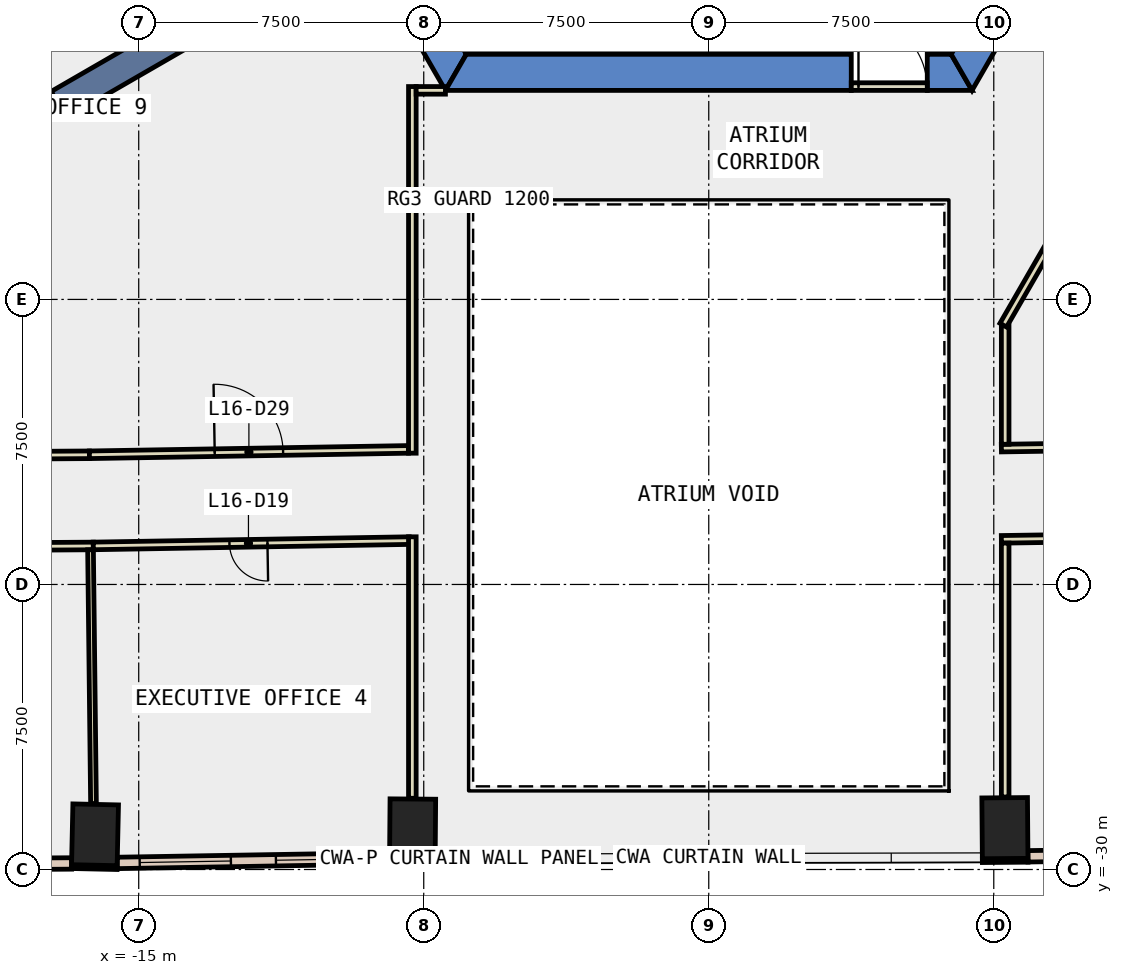
"""IFC4 building model, lengths in metres.
Left out: names, types, materials, properties, quantities, classifications, styles, units other than length and angle.
Written with IfcOpenShell. Run it as: python <this file> out.ifc"""

import sys

from ifc_helpers import new_model, si_unit, direction, frame, frame_2d, origin, origin_2d, place, context, subcontext, project, spatial, polyline, rectangle, outline, extrude, element, fill, save


model = new_model("IFC4")
c1 = context("Model", 3, precision=1e-05, world=origin(), true_north=direction((0.0, 1.0)))
c2 = subcontext(c1, "Body", "Model", "MODEL_VIEW")
j1 = project(units=[si_unit("LENGTHUNIT", "METRE"), si_unit("PLANEANGLEUNIT", "RADIAN")], contexts=[c1])
p1 = place(None, origin())
s1 = spatial("IfcSite", under=j1, at=p1, CompositionType="ELEMENT")
p2 = place(p1, origin())
s2 = spatial("IfcBuilding", under=s1, at=p2, CompositionType="ELEMENT")
p3 = place(p2, frame((0.0, 0.0, 77.0)))
s3 = spatial("IfcBuildingStorey", under=s2, at=p3, CompositionType="ELEMENT", Elevation=77.0)
for number, where, z_axis, x_axis in (
    (1, (-16.15, -29.087, -0.4), (0.0, 0.0, 1.0), (-1.0, 0.022, 0.0)),
    (2, (-7.793, -28.946, -0.4), (0.0, 0.0, 1.0), (-1.0, 0.008, 0.0)),
    (3, (7.793, -28.912, -0.4), (0.0, 0.0, 1.0), (1.0, 0.008, 0.0)),
):
    element("IfcColumn", number, at=place(p3, frame(where, z_axis=z_axis, x_axis=x_axis)), inside=s3, PredefinedType="COLUMN", context=c2, shape_type="SweptSolid", body=[
        extrude(rectangle(XDim=1.2, YDim=1.6, at=origin_2d()), origin(), (0.0, 0.0, 1.0), 4.0),
    ])
p4 = place(p3, frame((0.0, 0.0, -0.4)))
e4 = element("IfcWall", 4, at=p4, inside=s3, PredefinedType="SHEAR", context=c2, shape_type="SweptSolid", body=[
    extrude(outline(polyline([(-13.856, 2.5), (-6.928, -9.5), (-6.38, -8.55), (-12.759, 2.5), (-13.856, 2.5)])), origin(), (0.0, 0.0, 1.0), 4.0),
])
p5 = place(p3, frame((0.0, 0.0, -0.4)))
e5 = element("IfcWall", 5, at=p5, inside=s3, PredefinedType="SHEAR", context=c2, shape_type="SweptSolid", body=[
    extrude(outline(polyline([(3.75, -9.5), (3.75, -8.55), (-6.38, -8.55), (-6.928, -9.5), (3.75, -9.5)])), origin(), (0.0, 0.0, 1.0), 4.0),
])
p6 = place(p3, frame((0.0, 0.0, -0.4)))
e6 = element("IfcWall", 6, at=p6, inside=s3, PredefinedType="SHEAR", context=c2, shape_type="SweptSolid", body=[
    extrude(outline(polyline([(5.75, -8.55), (5.75, -9.5), (6.928, -9.5), (6.38, -8.55), (5.75, -8.55)])), origin(), (0.0, 0.0, 1.0), 4.0),
])
p7 = place(p3, frame((0.0, 0.0, -0.4)))
e7 = element("IfcWall", 7, at=p7, inside=s3, PredefinedType="SHEAR", context=c2, shape_type="SweptSolid", body=[
    extrude(outline(polyline([(8.117, -7.44), (7.295, -6.965), (6.38, -8.55), (6.928, -9.5), (8.117, -7.44)])), origin(), (0.0, 0.0, 1.0), 4.0),
])
p8 = place(p3, frame((-9.31, -5.375, -0.4), z_axis=(0.0, 0.0, 1.0), x_axis=(-0.866017533419, -0.500013631625, 0.0)))
e8 = element("IfcWall", 8, at=p8, inside=s3, PredefinedType="SHEAR", context=c2, shape_type="SweptSolid", body=[
    extrude(rectangle(XDim=9.0, YDim=0.8, at=frame_2d((4.5, 0.0))), origin(), (0.0, 0.0, 1.0), 4.0),
])
p9 = place(p3, frame((-16.769, -29.924, 0.0), z_axis=(0.0, 0.0, 1.0), x_axis=(0.99976752127, -0.021561618973, 0.0)))
e9 = element("IfcWall", 9, at=p9, inside=s3, PredefinedType="STANDARD", context=c2, shape_type="SweptSolid", body=[
    extrude(rectangle(XDim=1.2, YDim=0.1, at=frame_2d((0.6, 0.0))), origin(), (0.0, 0.0, 1.0), 3.6),
])
for number, where, z_axis, x_axis in (
    (10, (-8.4, -29.791, 0.0), (0.0, 0.0, 1.0), (1.0, -0.008, 0.0)),
    (11, (7.2, -29.767, 0.0), (0.0, 0.0, 1.0), (1.0, 0.008, 0.0)),
):
    element("IfcWall", number, at=place(p3, frame(where, z_axis=z_axis, x_axis=x_axis)), inside=s3, PredefinedType="STANDARD", context=c2, shape_type="SweptSolid", body=[
        extrude(rectangle(XDim=1.2, YDim=0.1, at=frame_2d((0.6, 0.0))), origin(), (0.0, 0.0, 1.0), 3.6),
    ])
p10 = place(p3, frame((-23.935, -29.888, 0.0), z_axis=(0.0, 0.0, 1.0), x_axis=(0.999978623918, 0.006538478947, 0.0)))
e12 = element("IfcWall", 12, at=p10, inside=s3, PredefinedType="STANDARD", context=c2, shape_type="SweptSolid", body=[
    extrude(rectangle(XDim=7.169, YDim=0.3, at=frame_2d((3.584, 0.0))), origin(), (0.0, 0.0, 1.0), 3.6),
])
p11 = place(p10, frame((0.592, 0.0, 0.9)))
e13 = element("IfcOpeningElement", 13, at=p11, cuts=e12, PredefinedType="OPENING", context=c2, shape_type="SweptSolid", body=[
    extrude(rectangle(XDim=2.4, YDim=2.6, at=frame_2d((1.2, 1.3))), frame((0.0, 0.16, 0.0), z_axis=(0.0, -1.0, 0.0), x_axis=(1.0, 0.0, 0.0)), (0.0, 0.0, 1.0), 0.32),
])
p12 = place(p10, frame((4.177, 0.0, 0.9)))
e14 = element("IfcOpeningElement", 14, at=p12, cuts=e12, PredefinedType="OPENING", context=c2, shape_type="SweptSolid", body=[
    extrude(rectangle(XDim=2.4, YDim=2.6, at=frame_2d((1.2, 1.3))), frame((0.0, 0.16, 0.0), z_axis=(0.0, -1.0, 0.0), x_axis=(1.0, 0.0, 0.0)), (0.0, 0.0, 1.0), 0.32),
])
p13 = place(p3, frame((-15.567, -29.827, 0.0), z_axis=(0.0, 0.0, 1.0), x_axis=(0.999857944706, 0.0168549817, 0.0)))
e15 = element("IfcWall", 15, at=p13, inside=s3, PredefinedType="STANDARD", context=c2, shape_type="SweptSolid", body=[
    extrude(rectangle(XDim=7.17, YDim=0.3, at=frame_2d((3.585, 0.0))), origin(), (0.0, 0.0, 1.0), 3.6),
])
p14 = place(p13, frame((0.593, 0.0, 0.9)))
e16 = element("IfcOpeningElement", 16, at=p14, cuts=e15, PredefinedType="OPENING", context=c2, shape_type="SweptSolid", body=[
    extrude(rectangle(XDim=2.4, YDim=2.6, at=frame_2d((1.2, 1.3))), frame((0.0, 0.16, 0.0), z_axis=(0.0, -1.0, 0.0), x_axis=(1.0, 0.0, 0.0)), (0.0, 0.0, 1.0), 0.32),
])
p15 = place(p13, frame((4.178, 0.0, 0.9)))
e17 = element("IfcOpeningElement", 17, at=p15, cuts=e15, PredefinedType="OPENING", context=c2, shape_type="SweptSolid", body=[
    extrude(rectangle(XDim=2.4, YDim=2.6, at=frame_2d((1.2, 1.3))), frame((0.0, 0.16, 0.0), z_axis=(0.0, -1.0, 0.0), x_axis=(1.0, 0.0, 0.0)), (0.0, 0.0, 1.0), 0.32),
])
p16 = place(p3, frame((8.398, -29.653, 0.0), z_axis=(0.0, 0.0, 1.0), x_axis=(0.999888301342, 0.014946064363, 0.0)))
e18 = element("IfcWall", 18, at=p16, inside=s3, PredefinedType="STANDARD", context=c2, shape_type="SweptSolid", body=[
    extrude(rectangle(XDim=7.171, YDim=0.3, at=frame_2d((3.585, 0.0))), origin(), (0.0, 0.0, 1.0), 3.6),
])
p17 = place(p16, frame((0.593, 0.0, 0.9)))
e19 = element("IfcOpeningElement", 19, at=p17, cuts=e18, PredefinedType="OPENING", context=c2, shape_type="SweptSolid", body=[
    extrude(rectangle(XDim=2.4, YDim=2.6, at=frame_2d((1.2, 1.3))), frame((0.0, 0.16, 0.0), z_axis=(0.0, -1.0, 0.0), x_axis=(1.0, 0.0, 0.0)), (0.0, 0.0, 1.0), 0.32),
])
p18 = place(p16, frame((4.178, 0.0, 0.9)))
e20 = element("IfcOpeningElement", 20, at=p18, cuts=e18, PredefinedType="OPENING", context=c2, shape_type="SweptSolid", body=[
    extrude(rectangle(XDim=2.4, YDim=2.6, at=frame_2d((1.2, 1.3))), frame((0.0, 0.16, 0.0), z_axis=(0.0, -1.0, 0.0), x_axis=(1.0, 0.0, 0.0)), (0.0, 0.0, 1.0), 0.32),
])
p19 = place(p3, frame((7.7, -18.912, 0.0), z_axis=(0.0, 0.0, 1.0), x_axis=(0.999888819649, 0.014911349423, 0.0)))
e21 = element("IfcWall", 21, at=p19, inside=s3, PredefinedType="PARTITIONING", context=c2, shape_type="SweptSolid", body=[
    extrude(rectangle(XDim=8.252, YDim=0.2, at=frame_2d((4.126, 0.0))), origin(), (0.0, 0.0, 1.0), 3.6),
])
p20 = place(p19, frame((3.626, 0.0, 0.0)))
e22 = element("IfcOpeningElement", 22, at=p20, cuts=e21, PredefinedType="OPENING", context=c2, shape_type="SweptSolid", body=[
    extrude(rectangle(XDim=1.0, YDim=2.1, at=frame_2d((0.5, 1.05))), frame((0.0, 0.11, 0.0), z_axis=(0.0, -1.0, 0.0), x_axis=(1.0, 0.0, 0.0)), (0.0, 0.0, 1.0), 0.22),
])
p21 = place(p3, frame((-24.528, -19.142, 0.0), z_axis=(0.0, 0.0, 1.0), x_axis=(0.999978315754, 0.00658544011, 0.0)))
e23 = element("IfcWall", 23, at=p21, inside=s3, PredefinedType="PARTITIONING", context=c2, shape_type="SweptSolid", body=[
    extrude(rectangle(XDim=8.23, YDim=0.2, at=frame_2d((4.115, 0.0))), origin(), (0.0, 0.0, 1.0), 3.6),
])
p22 = place(p3, frame((-16.298, -19.088, 0.0), z_axis=(0.0, 0.0, 1.0), x_axis=(0.999857252997, 0.016895964865, 0.0)))
e24 = element("IfcWall", 24, at=p22, inside=s3, PredefinedType="PARTITIONING", context=c2, shape_type="SweptSolid", body=[
    extrude(rectangle(XDim=8.395, YDim=0.2, at=frame_2d((4.198, 0.0))), origin(), (0.0, 0.0, 1.0), 3.6),
])
p23 = place(p22, frame((3.298, 0.0, 0.0)))
e25 = element("IfcOpeningElement", 25, at=p23, cuts=e24, PredefinedType="OPENING", context=c2, shape_type="SweptSolid", body=[
    extrude(rectangle(XDim=1.8, YDim=2.1, at=frame_2d((0.9, 1.05))), frame((0.0, 0.11, 0.0), z_axis=(0.0, -1.0, 0.0), x_axis=(1.0, 0.0, 0.0)), (0.0, 0.0, 1.0), 0.22),
])
p24 = place(p3, frame((15.999, -21.189, 0.0), z_axis=(0.0, 0.0, 1.0), x_axis=(-0.999888353348, -0.014942584753, 0.0)))
e26 = element("IfcWall", 26, at=p24, inside=s3, PredefinedType="PARTITIONING", context=c2, shape_type="SweptSolid", body=[
    extrude(rectangle(XDim=8.3, YDim=0.2, at=frame_2d((4.15, 0.0))), origin(), (0.0, 0.0, 1.0), 3.6),
])
p25 = place(p24, frame((3.55, 0.0, 0.0)))
e27 = element("IfcOpeningElement", 27, at=p25, cuts=e26, PredefinedType="OPENING", context=c2, shape_type="SweptSolid", body=[
    extrude(rectangle(XDim=1.0, YDim=2.1, at=frame_2d((0.5, 1.05))), frame((0.0, 0.11, 0.0), z_axis=(0.0, -1.0, 0.0), x_axis=(1.0, 0.0, 0.0)), (0.0, 0.0, 1.0), 0.22),
])
p26 = place(p3, frame((-16.195, -21.487, 0.0), z_axis=(0.0, 0.0, 1.0), x_axis=(-0.999978288386, -0.006589594508, 0.0)))
e28 = element("IfcWall", 28, at=p26, inside=s3, PredefinedType="PARTITIONING", context=c2, shape_type="SweptSolid", body=[
    extrude(rectangle(XDim=8.336, YDim=0.2, at=frame_2d((4.168, 0.0))), origin(), (0.0, 0.0, 1.0), 3.6),
])
p27 = place(p26, frame((3.706, 0.0, 0.0)))
e29 = element("IfcOpeningElement", 29, at=p27, cuts=e28, PredefinedType="OPENING", context=c2, shape_type="SweptSolid", body=[
    extrude(rectangle(XDim=1.0, YDim=2.1, at=frame_2d((0.5, 1.05))), frame((0.0, 0.11, 0.0), z_axis=(0.0, -1.0, 0.0), x_axis=(1.0, 0.0, 0.0)), (0.0, 0.0, 1.0), 0.22),
])
p28 = place(p3, frame((-7.881, -21.346, 0.0), z_axis=(0.0, 0.0, 1.0), x_axis=(-0.999857974935, -0.016853188395, 0.0)))
e30 = element("IfcWall", 30, at=p28, inside=s3, PredefinedType="PARTITIONING", context=c2, shape_type="SweptSolid", body=[
    extrude(rectangle(XDim=8.315, YDim=0.2, at=frame_2d((4.158, 0.0))), origin(), (0.0, 0.0, 1.0), 3.6),
])
p29 = place(p28, frame((3.732, 0.0, 0.0)))
e31 = element("IfcOpeningElement", 31, at=p29, cuts=e30, PredefinedType="OPENING", context=c2, shape_type="SweptSolid", body=[
    extrude(rectangle(XDim=1.0, YDim=2.1, at=frame_2d((0.5, 1.05))), frame((0.0, 0.11, 0.0), z_axis=(0.0, -1.0, 0.0), x_axis=(1.0, 0.0, 0.0)), (0.0, 0.0, 1.0), 0.22),
])
p30 = place(p3, frame((7.8, -15.69, 0.0), z_axis=(0.0, 0.0, 1.0), x_axis=(0.0, -1.0, 0.0)))
e32 = element("IfcWall", 32, at=p30, inside=s3, PredefinedType="PARTITIONING", context=c2, shape_type="SweptSolid", body=[
    extrude(rectangle(XDim=3.121, YDim=0.2, at=frame_2d((1.561, 0.0))), origin(), (0.0, 0.0, 1.0), 3.6),
])
p31 = place(p3, frame((-7.8, -19.046, 0.0), z_axis=(0.0, 0.0, 1.0), x_axis=(0.0, 1.0, 0.0)))
e33 = element("IfcWall", 33, at=p31, inside=s3, PredefinedType="PARTITIONING", context=c2, shape_type="SweptSolid", body=[
    extrude(rectangle(XDim=9.647, YDim=0.2, at=frame_2d((4.823, 0.0))), origin(), (0.0, 0.0, 1.0), 3.6),
])
p32 = place(p3, frame((-7.7, -9.499, 0.0), z_axis=(0.0, 0.0, 1.0), x_axis=(1.0, 0.0, 0.0)))
e34 = element("IfcWall", 34, at=p32, inside=s3, PredefinedType="PARTITIONING", context=c2, shape_type="SweptSolid", body=[
    extrude(rectangle(XDim=0.771, YDim=0.2, at=frame_2d((0.385, 0.0))), origin(), (0.0, 0.0, 1.0), 3.6),
])
p33 = place(p3, frame((7.8, -21.411, 0.0), z_axis=(0.0, 0.0, 1.0), x_axis=(0.0, -1.0, 0.0)))
e35 = element("IfcWall", 35, at=p33, inside=s3, PredefinedType="PARTITIONING", context=c2, shape_type="SweptSolid", body=[
    extrude(rectangle(XDim=6.681, YDim=0.2, at=frame_2d((3.341, 0.0))), origin(), (0.0, 0.0, 1.0), 3.6),
])
p34 = place(p3, frame((-7.8, -28.126, 0.0), z_axis=(0.0, 0.0, 1.0), x_axis=(0.0, 1.0, 0.0)))
e36 = element("IfcWall", 36, at=p34, inside=s3, PredefinedType="PARTITIONING", context=c2, shape_type="SweptSolid", body=[
    extrude(rectangle(XDim=6.88, YDim=0.2, at=frame_2d((3.44, 0.0))), origin(), (0.0, 0.0, 1.0), 3.6),
])
p35 = place(p3, frame((12.4, -7.621, 0.0), z_axis=(0.0, 0.0, 1.0), x_axis=(-0.49990497871, -0.866080257402, 0.0)))
e37 = element("IfcWall", 37, at=p35, inside=s3, PredefinedType="PARTITIONING", context=c2, shape_type="SweptSolid", body=[
    extrude(rectangle(XDim=9.302, YDim=0.2, at=frame_2d((4.651, 0.0))), origin(), (0.0, 0.0, 1.0), 3.6),
])
p36 = place(p3, frame((-16.268, -21.587, 0.0), z_axis=(0.0, 0.0, 1.0), x_axis=(0.0116959614, -0.999931599904, 0.0)))
e38 = element("IfcWall", 38, at=p36, inside=s3, PredefinedType="PARTITIONING", context=c2, shape_type="SweptSolid", body=[
    extrude(rectangle(XDim=6.68, YDim=0.15, at=frame_2d((3.34, 0.0))), origin(), (0.0, 0.0, 1.0), 3.6),
])
p37 = place(p3, frame((3.75, -9.4, 0.0), z_axis=(0.0, 0.0, 1.0), x_axis=(1.0, 0.0, 0.0)))
e39 = element("IfcWall", 39, at=p37, inside=s3, PredefinedType="PARTITIONING", context=c2, shape_type="SweptSolid", body=[
    extrude(rectangle(XDim=2.0, YDim=0.2, at=frame_2d((1.0, 0.0))), origin(), (0.0, 0.0, 1.0), 2.4),
])
p38 = place(p37, frame((0.19, 0.0, 0.0)))
e40 = element("IfcOpeningElement", 40, at=p38, cuts=e39, PredefinedType="OPENING", context=c2, shape_type="SweptSolid", body=[
    extrude(rectangle(XDim=1.8, YDim=2.1, at=frame_2d((0.9, 1.05))), frame((0.0, 0.11, 0.0), z_axis=(0.0, -1.0, 0.0), x_axis=(1.0, 0.0, 0.0)), (0.0, 0.0, 1.0), 0.22),
])
p39 = place(p14, origin())
e41 = element("IfcWindow", 41, at=p39, inside=s3, PartitioningType="SINGLE_PANEL", PredefinedType="WINDOW", context=c2, shape_type="SweptSolid", body=[
    extrude(rectangle(XDim=2.4, YDim=2.6, at=frame_2d((1.2, 1.3))), frame((0.0, 0.03, 0.0), z_axis=(0.0, -1.0, 0.0), x_axis=(1.0, 0.0, 0.0)), (0.0, 0.0, 1.0), 0.06),
])
fill(e16, e41)
p40 = place(p15, origin())
e42 = element("IfcWindow", 42, at=p40, inside=s3, PartitioningType="SINGLE_PANEL", PredefinedType="WINDOW", context=c2, shape_type="SweptSolid", body=[
    extrude(rectangle(XDim=2.4, YDim=2.6, at=frame_2d((1.2, 1.3))), frame((0.0, 0.03, 0.0), z_axis=(0.0, -1.0, 0.0), x_axis=(1.0, 0.0, 0.0)), (0.0, 0.0, 1.0), 0.06),
])
fill(e17, e42)
p41 = place(p29, origin())
e43 = element("IfcDoor", 43, at=p41, inside=s3, OperationType="SINGLE_SWING_RIGHT", PredefinedType="DOOR", context=c2, shape_type="SweptSolid", body=[
    extrude(rectangle(XDim=1.0, YDim=2.1, at=frame_2d((0.5, 1.05))), frame((0.0, 0.025, 0.0), z_axis=(0.0, -1.0, 0.0), x_axis=(1.0, 0.0, 0.0)), (0.0, 0.0, 1.0), 0.05),
])
fill(e31, e43)
p42 = place(p23, origin())
e44 = element("IfcDoor", 44, at=p42, inside=s3, OperationType="DOUBLE_DOOR_SINGLE_SWING", PredefinedType="DOOR", context=c2, shape_type="SweptSolid", body=[
    extrude(rectangle(XDim=1.8, YDim=2.1, at=frame_2d((0.9, 1.05))), frame((0.0, 0.025, 0.0), z_axis=(0.0, -1.0, 0.0), x_axis=(1.0, 0.0, 0.0)), (0.0, 0.0, 1.0), 0.05),
])
fill(e25, e44)
p43 = place(p38, origin())
e45 = element("IfcDoor", 45, at=p43, inside=s3, OperationType="DOUBLE_DOOR_SINGLE_SWING", PredefinedType="DOOR", context=c2, shape_type="SweptSolid", body=[
    extrude(rectangle(XDim=1.8, YDim=2.1, at=frame_2d((0.9, 1.05))), frame((0.0, 0.025, 0.0), z_axis=(0.0, -1.0, 0.0), x_axis=(1.0, 0.0, 0.0)), (0.0, 0.0, 1.0), 0.05),
])
fill(e40, e45)
save(model, sys.argv[1])
